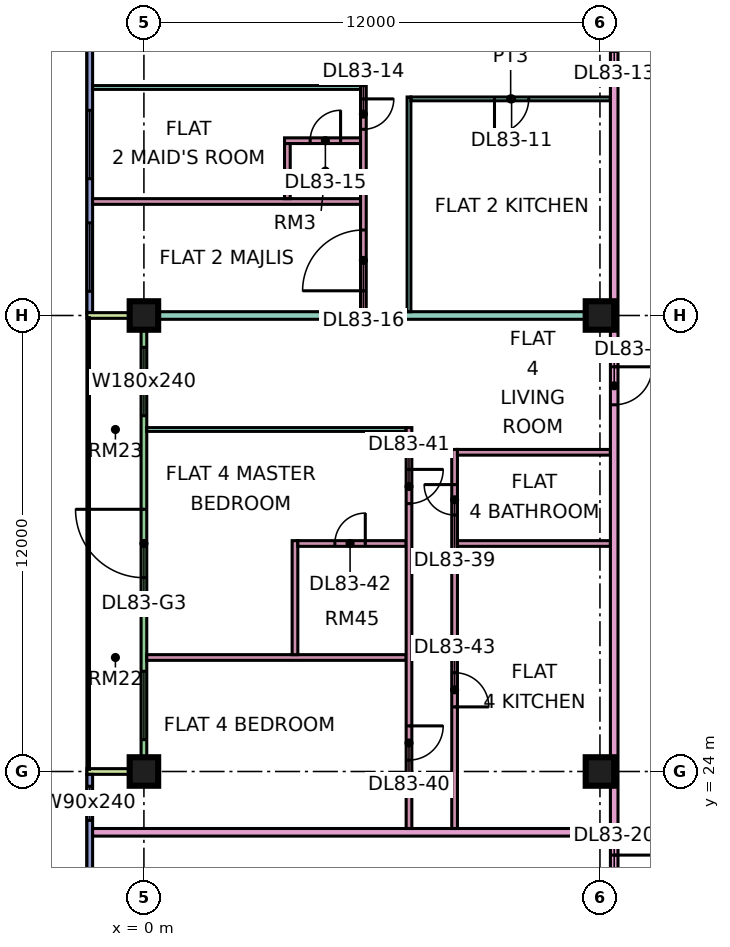
"""IFC4 building model, lengths in metres.
Left out: names, types, materials, properties, quantities, classifications, styles, units other than length and angle.
Written with IfcOpenShell. Run it as: python <this file> out.ifc"""

import sys

from ifc_helpers import new_model, si_unit, direction, frame, frame_2d, origin, origin_2d, place, context, subcontext, project, spatial, rectangle, extrude, element, fill, save


model = new_model("IFC4")
c1 = context("Model", 3, precision=1e-05, world=origin(), true_north=direction((0.0, 1.0)))
c2 = subcontext(c1, "Body", "Model", "MODEL_VIEW")
j1 = project(units=[si_unit("LENGTHUNIT", "METRE"), si_unit("PLANEANGLEUNIT", "RADIAN")], contexts=[c1])
p1 = place(None, origin())
s1 = spatial("IfcSite", under=j1, at=p1, CompositionType="ELEMENT")
p2 = place(p1, origin())
s2 = spatial("IfcBuilding", under=s1, at=p2, CompositionType="ELEMENT")
p3 = place(p2, frame((0.0, 0.0, 357.65)))
s3 = spatial("IfcBuildingStorey", under=s2, at=p3, CompositionType="ELEMENT", Elevation=357.65)
p4 = place(p3, frame((0.0, 24.0, 0.0), z_axis=(0.0, 0.0, 1.0), x_axis=(1.0, 0.0, 0.0)))
e1 = element("IfcColumn", 1, at=p4, inside=s3, PredefinedType="COLUMN", context=c2, shape_type="SweptSolid", body=[
    extrude(rectangle(XDim=0.75, YDim=0.75, at=origin_2d()), origin(), (0.0, 0.0, 1.0), 3.75),
])
p5 = place(p3, frame((0.0, 36.0, 0.0), z_axis=(0.0, 0.0, 1.0), x_axis=(1.0, 0.0, 0.0)))
e2 = element("IfcColumn", 2, at=p5, inside=s3, PredefinedType="COLUMN", context=c2, shape_type="SweptSolid", body=[
    extrude(rectangle(XDim=0.75, YDim=0.75, at=origin_2d()), origin(), (0.0, 0.0, 1.0), 3.75),
])
for number, where, z_axis, x_axis in (
    (3, (12.0, 24.0, 0.0), (0.0, 0.0, 1.0), (1.0, 0.0, 0.0)),
    (4, (12.0, 36.0, 0.0), (0.0, 0.0, 1.0), (1.0, 0.0, 0.0)),
):
    element("IfcColumn", number, at=place(p3, frame(where, z_axis=z_axis, x_axis=x_axis)), inside=s3, PredefinedType="COLUMN", context=c2, shape_type="SweptSolid", body=[
        extrude(rectangle(XDim=0.75, YDim=0.75, at=origin_2d()), origin(), (0.0, 0.0, 1.0), 3.75),
    ])
p6 = place(p3, frame((-1.425, 47.925, 0.0), z_axis=(0.0, 0.0, 1.0), x_axis=(0.0, -1.0, 0.0)))
e5 = element("IfcWall", 5, at=p6, inside=s3, PredefinedType="SOLIDWALL", context=c2, shape_type="SweptSolid", body=[
    extrude(rectangle(XDim=11.85, YDim=0.15, at=frame_2d((5.925, 0.0))), origin(), (0.0, 0.0, 1.0), 3.35),
])
p7 = place(p6, frame((1.462, 0.0, 0.45)))
e6 = element("IfcOpeningElement", 6, at=p7, cuts=e5, PredefinedType="OPENING", context=c2, shape_type="SweptSolid", body=[
    extrude(rectangle(XDim=3.0, YDim=2.4, at=frame_2d((1.5, 1.2))), frame((0.0, 0.085, 0.0), z_axis=(0.0, -1.0, 0.0), x_axis=(1.0, 0.0, 0.0)), (0.0, 0.0, 1.0), 0.17),
])
p8 = place(p6, frame((6.525, 0.0, 0.45)))
e7 = element("IfcOpeningElement", 7, at=p8, cuts=e5, PredefinedType="OPENING", context=c2, shape_type="SweptSolid", body=[
    extrude(rectangle(XDim=1.8, YDim=2.4, at=frame_2d((0.9, 1.2))), frame((0.0, 0.085, 0.0), z_axis=(0.0, -1.0, 0.0), x_axis=(1.0, 0.0, 0.0)), (0.0, 0.0, 1.0), 0.17),
])
p9 = place(p6, frame((9.488, 0.0, 0.45)))
e8 = element("IfcOpeningElement", 8, at=p9, cuts=e5, PredefinedType="OPENING", context=c2, shape_type="SweptSolid", body=[
    extrude(rectangle(XDim=1.8, YDim=2.4, at=frame_2d((0.9, 1.2))), frame((0.0, 0.085, 0.0), z_axis=(0.0, -1.0, 0.0), x_axis=(1.0, 0.0, 0.0)), (0.0, 0.0, 1.0), 0.17),
])
p10 = place(p3, frame((0.0, 35.925, 0.0), z_axis=(0.0, 0.0, 1.0), x_axis=(0.0, -1.0, 0.0)))
e9 = element("IfcWall", 9, at=p10, inside=s3, PredefinedType="SOLIDWALL", context=c2, shape_type="SweptSolid", body=[
    extrude(rectangle(XDim=11.85, YDim=0.15, at=frame_2d((5.925, 0.0))), origin(), (0.0, 0.0, 1.0), 3.35),
])
p11 = place(p10, frame((0.762, 0.0, 0.45)))
e10 = element("IfcOpeningElement", 10, at=p11, cuts=e9, PredefinedType="OPENING", context=c2, shape_type="SweptSolid", body=[
    extrude(rectangle(XDim=1.8, YDim=2.4, at=frame_2d((0.9, 1.2))), frame((0.0, 0.085, 0.0), z_axis=(0.0, -1.0, 0.0), x_axis=(1.0, 0.0, 0.0)), (0.0, 0.0, 1.0), 0.17),
])
p12 = place(p10, frame((5.025, 0.0, 0.0)))
e11 = element("IfcOpeningElement", 11, at=p12, cuts=e9, PredefinedType="OPENING", context=c2, shape_type="SweptSolid", body=[
    extrude(rectangle(XDim=1.8, YDim=2.4, at=frame_2d((0.9, 1.2))), frame((0.0, 0.085, 0.0), z_axis=(0.0, -1.0, 0.0), x_axis=(1.0, 0.0, 0.0)), (0.0, 0.0, 1.0), 0.17),
])
p13 = place(p10, frame((9.288, 0.0, 0.45)))
e12 = element("IfcOpeningElement", 12, at=p13, cuts=e9, PredefinedType="OPENING", context=c2, shape_type="SweptSolid", body=[
    extrude(rectangle(XDim=1.8, YDim=2.4, at=frame_2d((0.9, 1.2))), frame((0.0, 0.085, 0.0), z_axis=(0.0, -1.0, 0.0), x_axis=(1.0, 0.0, 0.0)), (0.0, 0.0, 1.0), 0.17),
])
for number, where, z_axis, x_axis in (
    (13, (-1.5, 36.0, 0.0), (0.0, 0.0, 1.0), (1.0, 0.0, 0.0)),
    (14, (-1.5, 24.0, 0.0), (0.0, 0.0, 1.0), (1.0, 0.0, 0.0)),
):
    element("IfcWall", number, at=place(p3, frame(where, z_axis=z_axis, x_axis=x_axis)), inside=s3, PredefinedType="SOLIDWALL", context=c2, shape_type="SweptSolid", body=[
        extrude(rectangle(XDim=1.5, YDim=0.15, at=frame_2d((0.75, 0.0))), origin(), (0.0, 0.0, 1.0), 3.35),
    ])
p14 = place(p3, frame((-1.425, 23.925, 0.0), z_axis=(0.0, 0.0, 1.0), x_axis=(0.0, -1.0, 0.0)))
e15 = element("IfcWall", 15, at=p14, inside=s3, PredefinedType="SOLIDWALL", context=c2, shape_type="SweptSolid", body=[
    extrude(rectangle(XDim=11.425, YDim=0.15, at=frame_2d((5.712, 0.0))), origin(), (0.0, 0.0, 1.0), 3.35),
])
p15 = place(p14, frame((0.312, 0.0, 0.45)))
e16 = element("IfcOpeningElement", 16, at=p15, cuts=e15, PredefinedType="OPENING", context=c2, shape_type="SweptSolid", body=[
    extrude(rectangle(XDim=0.9, YDim=2.4, at=frame_2d((0.45, 1.2))), frame((0.0, 0.085, 0.0), z_axis=(0.0, -1.0, 0.0), x_axis=(1.0, 0.0, 0.0)), (0.0, 0.0, 1.0), 0.17),
])
p16 = place(p14, frame((6.175, 0.0, 0.45)))
e17 = element("IfcOpeningElement", 17, at=p16, cuts=e15, PredefinedType="OPENING", context=c2, shape_type="SweptSolid", body=[
    extrude(rectangle(XDim=3.0, YDim=2.4, at=frame_2d((1.5, 1.2))), frame((0.0, 0.085, 0.0), z_axis=(0.0, -1.0, 0.0), x_axis=(1.0, 0.0, 0.0)), (0.0, 0.0, 1.0), 0.17),
])
p17 = place(p3, frame((-1.351, 39.0, 0.0), z_axis=(0.0, 0.0, 1.0), x_axis=(1.0, 0.0, 0.0)))
e18 = element("IfcWall", 18, at=p17, inside=s3, PredefinedType="PARTITIONING", context=c2, shape_type="SweptSolid", body=[
    extrude(rectangle(XDim=7.051, YDim=0.15, at=frame_2d((3.525, 0.0))), origin(), (0.0, 0.0, 1.0), 3.35),
])
p18 = place(p3, frame((-1.35, 22.4, 0.0), z_axis=(0.0, 0.0, 1.0), x_axis=(1.0, 0.0, 0.0)))
e19 = element("IfcWall", 19, at=p18, inside=s3, PredefinedType="PARTITIONING", context=c2, shape_type="SweptSolid", body=[
    extrude(rectangle(XDim=13.625, YDim=0.2, at=frame_2d((6.812, 0.0))), origin(), (0.0, 0.0, 1.0), 3.35),
])
e20 = element("IfcWall", 20, at=p5, inside=s3, PredefinedType="PARTITIONING", context=c2, shape_type="SweptSolid", body=[
    extrude(rectangle(XDim=12.275, YDim=0.2, at=frame_2d((6.137, 0.0))), origin(), (0.0, 0.0, 1.0), 3.35),
])
p19 = place(p3, frame((-1.35, 42.0, 0.0), z_axis=(0.0, 0.0, 1.0), x_axis=(1.0, 0.0, 0.0)))
e21 = element("IfcWall", 21, at=p19, inside=s3, PredefinedType="PARTITIONING", context=c2, shape_type="SweptSolid", body=[
    extrude(rectangle(XDim=7.05, YDim=0.1, at=frame_2d((3.525, 0.0))), origin(), (0.0, 0.0, 1.0), 3.35),
])
p20 = place(p3, frame((0.074, 27.0, 0.0), z_axis=(0.0, 0.0, 1.0), x_axis=(1.0, 0.0, 0.0)))
e22 = element("IfcWall", 22, at=p20, inside=s3, PredefinedType="PARTITIONING", context=c2, shape_type="SweptSolid", body=[
    extrude(rectangle(XDim=6.826, YDim=0.15, at=frame_2d((3.413, 0.0))), origin(), (0.0, 0.0, 1.0), 3.35),
])
p21 = place(p3, frame((0.074, 33.0, 0.0), z_axis=(0.0, 0.0, 1.0), x_axis=(1.0, 0.0, 0.0)))
e23 = element("IfcWall", 23, at=p21, inside=s3, PredefinedType="PARTITIONING", context=c2, shape_type="SweptSolid", body=[
    extrude(rectangle(XDim=6.826, YDim=0.1, at=frame_2d((3.413, 0.0))), origin(), (0.0, 0.0, 1.0), 3.35),
])
p22 = place(p3, frame((3.7, 40.6, 0.0), z_axis=(0.0, 0.0, 1.0), x_axis=(1.0, 0.0, 0.0)))
e24 = element("IfcWall", 24, at=p22, inside=s3, PredefinedType="PARTITIONING", context=c2, shape_type="SweptSolid", body=[
    extrude(rectangle(XDim=2.0, YDim=0.15, at=frame_2d((1.0, 0.0))), origin(), (0.0, 0.0, 1.0), 3.35),
])
p23 = place(p22, frame((0.675, 0.0, 0.0)))
e25 = element("IfcOpeningElement", 25, at=p23, cuts=e24, PredefinedType="OPENING", context=c2, shape_type="SweptSolid", body=[
    extrude(rectangle(XDim=0.8, YDim=2.1, at=frame_2d((0.4, 1.05))), frame((0.0, 0.085, 0.0), z_axis=(0.0, -1.0, 0.0), x_axis=(1.0, 0.0, 0.0)), (0.0, 0.0, 1.0), 0.17),
])
p24 = place(p3, frame((3.775, 39.075, 0.0), z_axis=(0.0, 0.0, 1.0), x_axis=(0.0, 1.0, 0.0)))
e26 = element("IfcWall", 26, at=p24, inside=s3, PredefinedType="PARTITIONING", context=c2, shape_type="SweptSolid", body=[
    extrude(rectangle(XDim=1.45, YDim=0.15, at=frame_2d((0.725, 0.0))), origin(), (0.0, 0.0, 1.0), 3.35),
])
p25 = place(p3, frame((3.975, 27.075, 0.0), z_axis=(0.0, 0.0, 1.0), x_axis=(0.0, 1.0, 0.0)))
e27 = element("IfcWall", 27, at=p25, inside=s3, PredefinedType="PARTITIONING", context=c2, shape_type="SweptSolid", body=[
    extrude(rectangle(XDim=3.0, YDim=0.15, at=frame_2d((1.5, 0.0))), origin(), (0.0, 0.0, 1.0), 3.35),
])
p26 = place(p3, frame((4.05, 30.0, 0.0), z_axis=(0.0, 0.0, 1.0), x_axis=(1.0, 0.0, 0.0)))
e28 = element("IfcWall", 28, at=p26, inside=s3, PredefinedType="PARTITIONING", context=c2, shape_type="SweptSolid", body=[
    extrude(rectangle(XDim=2.85, YDim=0.15, at=frame_2d((1.425, 0.0))), origin(), (0.0, 0.0, 1.0), 3.35),
])
p27 = place(p26, frame((0.975, 0.0, 0.0)))
e29 = element("IfcOpeningElement", 29, at=p27, cuts=e28, PredefinedType="OPENING", context=c2, shape_type="SweptSolid", body=[
    extrude(rectangle(XDim=0.8, YDim=2.1, at=frame_2d((0.4, 1.05))), frame((0.0, 0.085, 0.0), z_axis=(0.0, -1.0, 0.0), x_axis=(1.0, 0.0, 0.0)), (0.0, 0.0, 1.0), 0.17),
])
p28 = place(p3, frame((5.775, 36.1, 0.0), z_axis=(0.0, 0.0, 1.0), x_axis=(0.0, 1.0, 0.0)))
e30 = element("IfcWall", 30, at=p28, inside=s3, PredefinedType="PARTITIONING", context=c2, shape_type="SweptSolid", body=[
    extrude(rectangle(XDim=5.95, YDim=0.15, at=frame_2d((2.975, 0.0))), origin(), (0.0, 0.0, 1.0), 3.35),
])
p29 = place(p28, frame((4.8, 0.0, 0.0)))
e31 = element("IfcOpeningElement", 31, at=p29, cuts=e30, PredefinedType="OPENING", context=c2, shape_type="SweptSolid", body=[
    extrude(rectangle(XDim=0.8, YDim=2.1, at=frame_2d((0.4, 1.05))), frame((0.0, 0.085, 0.0), z_axis=(0.0, -1.0, 0.0), x_axis=(1.0, 0.0, 0.0)), (0.0, 0.0, 1.0), 0.17),
])
p30 = place(p28, frame((0.55, 0.0, 0.0)))
e32 = element("IfcOpeningElement", 32, at=p30, cuts=e30, PredefinedType="OPENING", context=c2, shape_type="SweptSolid", body=[
    extrude(rectangle(XDim=1.6, YDim=2.1, at=frame_2d((0.8, 1.05))), frame((0.0, 0.085, 0.0), z_axis=(0.0, -1.0, 0.0), x_axis=(1.0, 0.0, 0.0)), (0.0, 0.0, 1.0), 0.17),
])
p31 = place(p3, frame((6.975, 22.5, 0.0), z_axis=(0.0, 0.0, 1.0), x_axis=(0.0, 1.0, 0.0)))
e33 = element("IfcWall", 33, at=p31, inside=s3, PredefinedType="PARTITIONING", context=c2, shape_type="SweptSolid", body=[
    extrude(rectangle(XDim=10.55, YDim=0.15, at=frame_2d((5.275, 0.0))), origin(), (0.0, 0.0, 1.0), 3.35),
])
p32 = place(p31, frame((1.8, 0.0, 0.0)))
e34 = element("IfcOpeningElement", 34, at=p32, cuts=e33, PredefinedType="OPENING", context=c2, shape_type="SweptSolid", body=[
    extrude(rectangle(XDim=0.9, YDim=2.1, at=frame_2d((0.45, 1.05))), frame((0.0, 0.085, 0.0), z_axis=(0.0, -1.0, 0.0), x_axis=(1.0, 0.0, 0.0)), (0.0, 0.0, 1.0), 0.17),
])
p33 = place(p31, frame((8.55, 0.0, 0.0)))
e35 = element("IfcOpeningElement", 35, at=p33, cuts=e33, PredefinedType="OPENING", context=c2, shape_type="SweptSolid", body=[
    extrude(rectangle(XDim=0.9, YDim=2.1, at=frame_2d((0.45, 1.05))), frame((0.0, 0.085, 0.0), z_axis=(0.0, -1.0, 0.0), x_axis=(1.0, 0.0, 0.0)), (0.0, 0.0, 1.0), 0.17),
])
p34 = place(p3, frame((6.975, 36.1, 0.0), z_axis=(0.0, 0.0, 1.0), x_axis=(0.0, 1.0, 0.0)))
e36 = element("IfcWall", 36, at=p34, inside=s3, PredefinedType="PARTITIONING", context=c2, shape_type="SweptSolid", body=[
    extrude(rectangle(XDim=5.65, YDim=0.1, at=frame_2d((2.825, 0.0))), origin(), (0.0, 0.0, 1.0), 3.35),
])
p35 = place(p3, frame((7.025, 41.7, 0.0), z_axis=(0.0, 0.0, 1.0), x_axis=(1.0, 0.0, 0.0)))
e37 = element("IfcWall", 37, at=p35, inside=s3, PredefinedType="PARTITIONING", context=c2, shape_type="SweptSolid", body=[
    extrude(rectangle(XDim=5.25, YDim=0.1, at=frame_2d((2.625, 0.0))), origin(), (0.0, 0.0, 1.0), 3.35),
])
p36 = place(p35, frame((2.2, 0.0, 0.0)))
e38 = element("IfcOpeningElement", 38, at=p36, cuts=e37, PredefinedType="OPENING", context=c2, shape_type="SweptSolid", body=[
    extrude(rectangle(XDim=0.9, YDim=2.1, at=frame_2d((0.45, 1.05))), frame((0.0, 0.06, 0.0), z_axis=(0.0, -1.0, 0.0), x_axis=(1.0, 0.0, 0.0)), (0.0, 0.0, 1.0), 0.12),
])
p37 = place(p3, frame((8.175, 22.5, 0.0), z_axis=(0.0, 0.0, 1.0), x_axis=(0.0, 1.0, 0.0)))
e39 = element("IfcWall", 39, at=p37, inside=s3, PredefinedType="PARTITIONING", context=c2, shape_type="SweptSolid", body=[
    extrude(rectangle(XDim=9.975, YDim=0.15, at=frame_2d((4.988, 0.0))), origin(), (0.0, 0.0, 1.0), 3.35),
])
p38 = place(p37, frame((8.25, 0.0, 0.0)))
e40 = element("IfcOpeningElement", 40, at=p38, cuts=e39, PredefinedType="OPENING", context=c2, shape_type="SweptSolid", body=[
    extrude(rectangle(XDim=0.8, YDim=2.1, at=frame_2d((0.4, 1.05))), frame((0.0, 0.085, 0.0), z_axis=(0.0, -1.0, 0.0), x_axis=(1.0, 0.0, 0.0)), (0.0, 0.0, 1.0), 0.17),
])
p39 = place(p37, frame((3.2, 0.0, 0.0)))
e41 = element("IfcOpeningElement", 41, at=p39, cuts=e39, PredefinedType="OPENING", context=c2, shape_type="SweptSolid", body=[
    extrude(rectangle(XDim=0.9, YDim=2.1, at=frame_2d((0.45, 1.05))), frame((0.0, 0.085, 0.0), z_axis=(0.0, -1.0, 0.0), x_axis=(1.0, 0.0, 0.0)), (0.0, 0.0, 1.0), 0.17),
])
for number, where, z_axis, x_axis in (
    (42, (8.25, 30.0, 0.0), (0.0, 0.0, 1.0), (1.0, 0.0, 0.0)),
    (43, (8.25, 32.4, 0.0), (0.0, 0.0, 1.0), (1.0, 0.0, 0.0)),
):
    element("IfcWall", number, at=place(p3, frame(where, z_axis=z_axis, x_axis=x_axis)), inside=s3, PredefinedType="PARTITIONING", context=c2, shape_type="SweptSolid", body=[
        extrude(rectangle(XDim=4.025, YDim=0.15, at=frame_2d((2.012, 0.0))), origin(), (0.0, 0.0, 1.0), 3.35),
    ])
p40 = place(p3, frame((12.375, 20.0, 0.0), z_axis=(0.0, 0.0, 1.0), x_axis=(0.0, 1.0, 0.0)))
e44 = element("IfcWall", 44, at=p40, inside=s3, PredefinedType="PARTITIONING", context=c2, shape_type="SweptSolid", body=[
    extrude(rectangle(XDim=34.0, YDim=0.2, at=frame_2d((17.0, 0.0))), origin(), (0.0, 0.0, 1.0), 3.35),
])
p41 = place(p40, frame((22.95, 0.0, 0.0)))
e45 = element("IfcOpeningElement", 45, at=p41, cuts=e44, PredefinedType="OPENING", context=c2, shape_type="SweptSolid", body=[
    extrude(rectangle(XDim=1.0, YDim=2.1, at=frame_2d((0.5, 1.05))), frame((0.0, 0.11, 0.0), z_axis=(0.0, -1.0, 0.0), x_axis=(1.0, 0.0, 0.0)), (0.0, 0.0, 1.0), 0.22),
])
p42 = place(p40, frame((0.6, 0.0, 0.0)))
e46 = element("IfcOpeningElement", 46, at=p42, cuts=e44, PredefinedType="OPENING", context=c2, shape_type="SweptSolid", body=[
    extrude(rectangle(XDim=1.2, YDim=2.1, at=frame_2d((0.6, 1.05))), frame((0.0, 0.11, 0.0), z_axis=(0.0, -1.0, 0.0), x_axis=(1.0, 0.0, 0.0)), (0.0, 0.0, 1.0), 0.22),
])
p43 = place(p40, frame((13.65, 0.0, 0.0)))
e47 = element("IfcOpeningElement", 47, at=p43, cuts=e44, PredefinedType="OPENING", context=c2, shape_type="SweptSolid", body=[
    extrude(rectangle(XDim=1.0, YDim=2.1, at=frame_2d((0.5, 1.05))), frame((0.0, 0.11, 0.0), z_axis=(0.0, -1.0, 0.0), x_axis=(1.0, 0.0, 0.0)), (0.0, 0.0, 1.0), 0.22),
])
p44 = place(p8, origin())
e48 = element("IfcWindow", 48, at=p44, inside=s3, PartitioningType="SINGLE_PANEL", PredefinedType="WINDOW", context=c2, shape_type="SweptSolid", body=[
    extrude(rectangle(XDim=1.8, YDim=2.4, at=frame_2d((0.9, 1.2))), frame((0.0, 0.03, 0.0), z_axis=(0.0, -1.0, 0.0), x_axis=(1.0, 0.0, 0.0)), (0.0, 0.0, 1.0), 0.06),
])
fill(e7, e48)
p45 = place(p9, origin())
e49 = element("IfcWindow", 49, at=p45, inside=s3, PartitioningType="SINGLE_PANEL", PredefinedType="WINDOW", context=c2, shape_type="SweptSolid", body=[
    extrude(rectangle(XDim=1.8, YDim=2.4, at=frame_2d((0.9, 1.2))), frame((0.0, 0.03, 0.0), z_axis=(0.0, -1.0, 0.0), x_axis=(1.0, 0.0, 0.0)), (0.0, 0.0, 1.0), 0.06),
])
fill(e8, e49)
p46 = place(p11, origin())
e50 = element("IfcWindow", 50, at=p46, inside=s3, PartitioningType="SINGLE_PANEL", PredefinedType="WINDOW", context=c2, shape_type="SweptSolid", body=[
    extrude(rectangle(XDim=1.8, YDim=2.4, at=frame_2d((0.9, 1.2))), frame((0.0, 0.03, 0.0), z_axis=(0.0, -1.0, 0.0), x_axis=(1.0, 0.0, 0.0)), (0.0, 0.0, 1.0), 0.06),
])
fill(e10, e50)
p47 = place(p12, frame((1.8, 0.0, 0.0), z_axis=(0.0, 0.0, 1.0), x_axis=(-1.0, 0.0, 0.0)))
e51 = element("IfcDoor", 51, at=p47, inside=s3, OperationType="DOUBLE_DOOR_SINGLE_SWING", PredefinedType="DOOR", context=c2, shape_type="SweptSolid", body=[
    extrude(rectangle(XDim=1.8, YDim=2.4, at=frame_2d((0.9, 1.2))), frame((0.0, 0.025, 0.0), z_axis=(0.0, -1.0, 0.0), x_axis=(1.0, 0.0, 0.0)), (0.0, 0.0, 1.0), 0.05),
])
fill(e11, e51)
p48 = place(p13, origin())
e52 = element("IfcWindow", 52, at=p48, inside=s3, PartitioningType="SINGLE_PANEL", PredefinedType="WINDOW", context=c2, shape_type="SweptSolid", body=[
    extrude(rectangle(XDim=1.8, YDim=2.4, at=frame_2d((0.9, 1.2))), frame((0.0, 0.03, 0.0), z_axis=(0.0, -1.0, 0.0), x_axis=(1.0, 0.0, 0.0)), (0.0, 0.0, 1.0), 0.06),
])
fill(e12, e52)
p49 = place(p15, origin())
e53 = element("IfcWindow", 53, at=p49, inside=s3, PartitioningType="SINGLE_PANEL", PredefinedType="WINDOW", context=c2, shape_type="SweptSolid", body=[
    extrude(rectangle(XDim=0.9, YDim=2.4, at=frame_2d((0.45, 1.2))), frame((0.0, 0.03, 0.0), z_axis=(0.0, -1.0, 0.0), x_axis=(1.0, 0.0, 0.0)), (0.0, 0.0, 1.0), 0.06),
])
fill(e16, e53)
p50 = place(p36, frame((0.9, 0.0, 0.0), z_axis=(0.0, 0.0, 1.0), x_axis=(-1.0, 0.0, 0.0)))
e54 = element("IfcDoor", 54, at=p50, inside=s3, OperationType="SINGLE_SWING_LEFT", PredefinedType="DOOR", context=c2, shape_type="SweptSolid", body=[
    extrude(rectangle(XDim=0.9, YDim=2.1, at=frame_2d((0.45, 1.05))), frame((0.0, 0.025, 0.0), z_axis=(0.0, -1.0, 0.0), x_axis=(1.0, 0.0, 0.0)), (0.0, 0.0, 1.0), 0.05),
])
fill(e38, e54)
p51 = place(p29, origin())
e55 = element("IfcDoor", 55, at=p51, inside=s3, OperationType="SINGLE_SWING_RIGHT", PredefinedType="DOOR", context=c2, shape_type="SweptSolid", body=[
    extrude(rectangle(XDim=0.8, YDim=2.1, at=frame_2d((0.4, 1.05))), frame((0.0, 0.025, 0.0), z_axis=(0.0, -1.0, 0.0), x_axis=(1.0, 0.0, 0.0)), (0.0, 0.0, 1.0), 0.05),
])
fill(e31, e55)
p52 = place(p23, frame((0.8, 0.0, 0.0), z_axis=(0.0, 0.0, 1.0), x_axis=(-1.0, 0.0, 0.0)))
e56 = element("IfcDoor", 56, at=p52, inside=s3, OperationType="SINGLE_SWING_RIGHT", PredefinedType="DOOR", context=c2, shape_type="SweptSolid", body=[
    extrude(rectangle(XDim=0.8, YDim=2.1, at=frame_2d((0.4, 1.05))), frame((0.0, 0.025, 0.0), z_axis=(0.0, -1.0, 0.0), x_axis=(1.0, 0.0, 0.0)), (0.0, 0.0, 1.0), 0.05),
])
fill(e25, e56)
p53 = place(p30, origin())
e57 = element("IfcDoor", 57, at=p53, inside=s3, OperationType="DOUBLE_DOOR_SINGLE_SWING", PredefinedType="DOOR", context=c2, shape_type="SweptSolid", body=[
    extrude(rectangle(XDim=1.6, YDim=2.1, at=frame_2d((0.8, 1.05))), frame((0.0, 0.025, 0.0), z_axis=(0.0, -1.0, 0.0), x_axis=(1.0, 0.0, 0.0)), (0.0, 0.0, 1.0), 0.05),
])
fill(e32, e57)
p54 = place(p42, origin())
e58 = element("IfcDoor", 58, at=p54, inside=s3, OperationType="SINGLE_SWING_RIGHT", PredefinedType="DOOR", context=c2, shape_type="SweptSolid", body=[
    extrude(rectangle(XDim=1.2, YDim=2.1, at=frame_2d((0.6, 1.05))), frame((0.0, 0.025, 0.0), z_axis=(0.0, -1.0, 0.0), x_axis=(1.0, 0.0, 0.0)), (0.0, 0.0, 1.0), 0.05),
])
fill(e46, e58)
p55 = place(p38, frame((0.8, 0.0, 0.0), z_axis=(0.0, 0.0, 1.0), x_axis=(-1.0, 0.0, 0.0)))
e59 = element("IfcDoor", 59, at=p55, inside=s3, OperationType="SINGLE_SWING_RIGHT", PredefinedType="DOOR", context=c2, shape_type="SweptSolid", body=[
    extrude(rectangle(XDim=0.8, YDim=2.1, at=frame_2d((0.4, 1.05))), frame((0.0, 0.025, 0.0), z_axis=(0.0, -1.0, 0.0), x_axis=(1.0, 0.0, 0.0)), (0.0, 0.0, 1.0), 0.05),
])
fill(e40, e59)
p56 = place(p32, origin())
e60 = element("IfcDoor", 60, at=p56, inside=s3, OperationType="SINGLE_SWING_RIGHT", PredefinedType="DOOR", context=c2, shape_type="SweptSolid", body=[
    extrude(rectangle(XDim=0.9, YDim=2.1, at=frame_2d((0.45, 1.05))), frame((0.0, 0.025, 0.0), z_axis=(0.0, -1.0, 0.0), x_axis=(1.0, 0.0, 0.0)), (0.0, 0.0, 1.0), 0.05),
])
fill(e34, e60)
p57 = place(p33, origin())
e61 = element("IfcDoor", 61, at=p57, inside=s3, OperationType="SINGLE_SWING_RIGHT", PredefinedType="DOOR", context=c2, shape_type="SweptSolid", body=[
    extrude(rectangle(XDim=0.9, YDim=2.1, at=frame_2d((0.45, 1.05))), frame((0.0, 0.025, 0.0), z_axis=(0.0, -1.0, 0.0), x_axis=(1.0, 0.0, 0.0)), (0.0, 0.0, 1.0), 0.05),
])
fill(e35, e61)
p58 = place(p27, frame((0.8, 0.0, 0.0), z_axis=(0.0, 0.0, 1.0), x_axis=(-1.0, 0.0, 0.0)))
e62 = element("IfcDoor", 62, at=p58, inside=s3, OperationType="SINGLE_SWING_RIGHT", PredefinedType="DOOR", context=c2, shape_type="SweptSolid", body=[
    extrude(rectangle(XDim=0.8, YDim=2.1, at=frame_2d((0.4, 1.05))), frame((0.0, 0.025, 0.0), z_axis=(0.0, -1.0, 0.0), x_axis=(1.0, 0.0, 0.0)), (0.0, 0.0, 1.0), 0.05),
])
fill(e29, e62)
p59 = place(p39, frame((0.9, 0.0, 0.0), z_axis=(0.0, 0.0, 1.0), x_axis=(-1.0, 0.0, 0.0)))
e63 = element("IfcDoor", 63, at=p59, inside=s3, OperationType="SINGLE_SWING_LEFT", PredefinedType="DOOR", context=c2, shape_type="SweptSolid", body=[
    extrude(rectangle(XDim=0.9, YDim=2.1, at=frame_2d((0.45, 1.05))), frame((0.0, 0.025, 0.0), z_axis=(0.0, -1.0, 0.0), x_axis=(1.0, 0.0, 0.0)), (0.0, 0.0, 1.0), 0.05),
])
fill(e41, e63)
p60 = place(p43, origin())
e64 = element("IfcDoor", 64, at=p60, inside=s3, OperationType="SINGLE_SWING_RIGHT", PredefinedType="DOOR", context=c2, shape_type="SweptSolid", body=[
    extrude(rectangle(XDim=1.0, YDim=2.1, at=frame_2d((0.5, 1.05))), frame((0.0, 0.025, 0.0), z_axis=(0.0, -1.0, 0.0), x_axis=(1.0, 0.0, 0.0)), (0.0, 0.0, 1.0), 0.05),
])
fill(e47, e64)
save(model, sys.argv[1])
